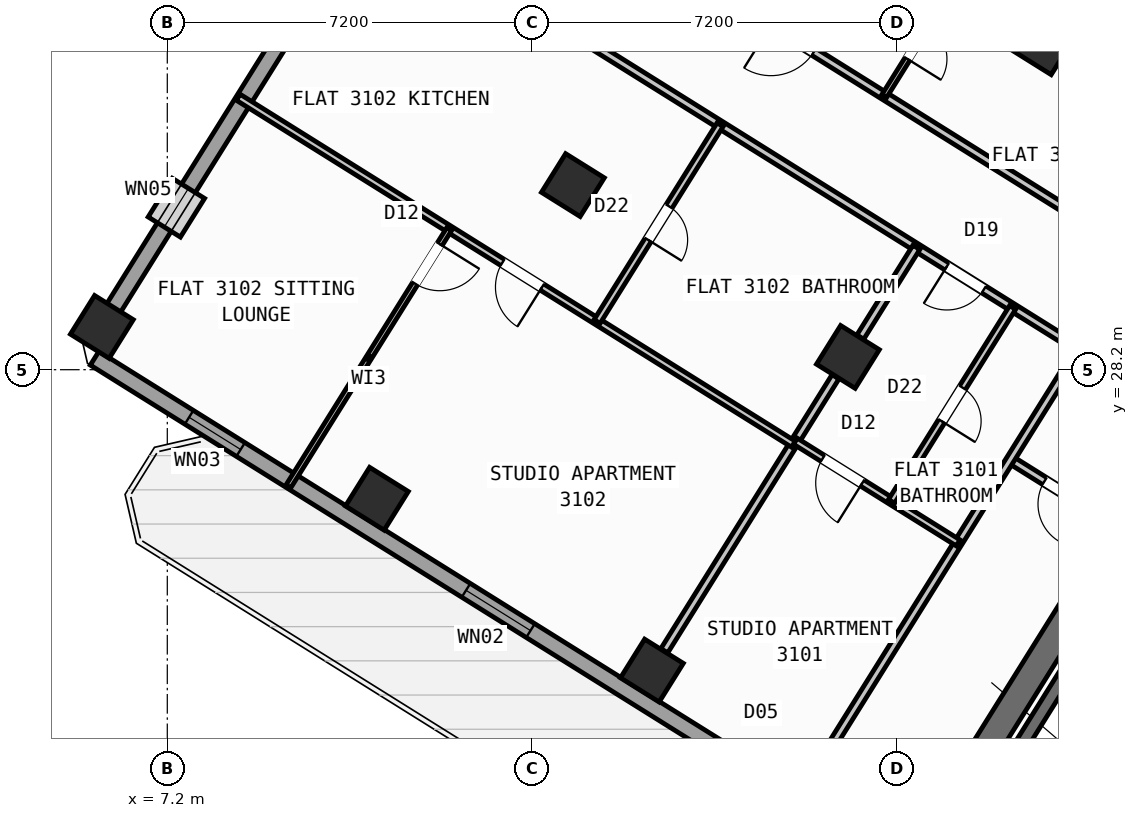
"""IFC4 building model, lengths in metres.
Left out: names, types, materials, properties, quantities, classifications, styles, units other than length and angle.
Written with IfcOpenShell. Run it as: python <this file> out.ifc"""

import sys

from ifc_helpers import new_model, si_unit, direction, frame, frame_2d, origin, origin_2d, place, context, subcontext, project, spatial, rectangle, hollow_rectangle, extrude, source, transform, mapped, element, fill, save


model = new_model("IFC4")
c1 = context("Model", 3, precision=1e-05, world=origin(), true_north=direction((0.0, 1.0)))
c2 = subcontext(c1, "Body", "Model", "MODEL_VIEW")
j1 = project(units=[si_unit("LENGTHUNIT", "METRE"), si_unit("PLANEANGLEUNIT", "RADIAN")], contexts=[c1])
p1 = place(None, origin())
s1 = spatial("IfcSite", under=j1, at=p1, CompositionType="ELEMENT")
p2 = place(p1, origin())
s2 = spatial("IfcBuilding", under=s1, at=p2, CompositionType="ELEMENT")
p3 = place(p2, frame((0.0, 0.0, 123.3)))
s3 = spatial("IfcBuildingStorey", under=s2, at=p3, CompositionType="ELEMENT", Elevation=123.3)
p4 = place(p3, frame((26.007, 24.976, 0.0), z_axis=(0.0, 0.0, 1.0), x_axis=(-0.529923795287, -0.848045264823, 0.0)))
e1 = element("IfcWall", 1, at=p4, inside=s3, PredefinedType="SHEAR", context=c2, shape_type="SweptSolid", body=[
    extrude(rectangle(XDim=6.425, YDim=0.55, at=frame_2d((3.212, 0.0))), origin(), (0.0, 0.0, 1.0), 4.22),
])
m1 = source(origin(), c2, "Body", "SweptSolid", [
    extrude(hollow_rectangle(XDim=0.9, YDim=0.9, WallThickness=0.036, at=origin_2d()), origin(), (0.0, 0.0, 1.0), 4.5),
])
for number, where, z_axis, x_axis in (
    (2, (24.5, 34.643, 0.0), (0.0, 0.0, 1.0), (-0.848, 0.53, 0.0)),
    (3, (20.632, 28.452, 0.0), (0.0, 0.0, 1.0), (-0.848, 0.53, 0.0)),
    (4, (16.764, 22.261, 0.0), (0.0, 0.0, 1.0), (-0.848, 0.53, 0.0)),
    (5, (15.205, 31.844, 0.0), (0.0, 0.0, 1.0), (-0.848, 0.53, 0.0)),
    (6, (11.336, 25.653, 0.0), (0.0, 0.0, 1.0), (-0.848, 0.53, 0.0)),
    (7, (5.909, 29.044, 0.0), (0.0, 0.0, 1.0), (-0.848, 0.53, 0.0)),
):
    element("IfcColumn", number, at=place(p3, frame(where, z_axis=z_axis, x_axis=x_axis)), inside=s3, PredefinedType="COLUMN", context=c2, shape_type="MappedRepresentation", body=[
        mapped(m1, transform((0.0, 0.0, 0.0), scale=1.0)),
    ])
p5 = place(p3, frame((31.76, 12.183, 0.0), z_axis=(0.0, 0.0, 1.0), x_axis=(-0.848047074256, 0.529920899612, 0.0)))
e8 = element("IfcWall", 8, at=p5, inside=s3, PredefinedType="STANDARD", context=c2, shape_type="SweptSolid", body=[
    extrude(rectangle(XDim=30.652, YDim=0.32, at=frame_2d((15.326, 0.0))), origin(), (0.0, 0.0, 1.0), 4.22),
])
p6 = place(p5, frame((14.966, 0.0, 0.0)))
e9 = element("IfcOpeningElement", 9, at=p6, cuts=e8, PredefinedType="OPENING", context=c2, shape_type="SweptSolid", body=[
    extrude(rectangle(XDim=1.2, YDim=2.15, at=frame_2d((0.6, 1.075))), frame((0.0, 0.17, 0.0), z_axis=(0.0, -1.0, 0.0), x_axis=(1.0, 0.0, 0.0)), (0.0, 0.0, 1.0), 0.34),
])
p7 = place(p5, frame((1.871, 0.0, 0.8)))
e10 = element("IfcOpeningElement", 10, at=p7, cuts=e8, PredefinedType="OPENING", context=c2, shape_type="SweptSolid", body=[
    extrude(rectangle(XDim=2.1, YDim=1.55, at=frame_2d((1.05, 0.775))), frame((0.0, 0.17, 0.0), z_axis=(0.0, -1.0, 0.0), x_axis=(1.0, 0.0, 0.0)), (0.0, 0.0, 1.0), 0.34),
])
p8 = place(p5, frame((6.546, 0.0, 0.8)))
e11 = element("IfcOpeningElement", 11, at=p8, cuts=e8, PredefinedType="OPENING", context=c2, shape_type="SweptSolid", body=[
    extrude(rectangle(XDim=2.1, YDim=1.55, at=frame_2d((1.05, 0.775))), frame((0.0, 0.17, 0.0), z_axis=(0.0, -1.0, 0.0), x_axis=(1.0, 0.0, 0.0)), (0.0, 0.0, 1.0), 0.34),
])
p9 = place(p5, frame((20.508, 0.0, 0.85)))
e12 = element("IfcOpeningElement", 12, at=p9, cuts=e8, PredefinedType="OPENING", context=c2, shape_type="SweptSolid", body=[
    extrude(rectangle(XDim=1.5, YDim=1.5, at=frame_2d((0.75, 0.75))), frame((0.0, 0.17, 0.0), z_axis=(0.0, -1.0, 0.0), x_axis=(1.0, 0.0, 0.0)), (0.0, 0.0, 1.0), 0.34),
])
p10 = place(p5, frame((27.253, 0.0, 0.95)))
e13 = element("IfcOpeningElement", 13, at=p10, cuts=e8, PredefinedType="OPENING", context=c2, shape_type="SweptSolid", body=[
    extrude(rectangle(XDim=1.2, YDim=1.4, at=frame_2d((0.6, 0.7))), frame((0.0, 0.17, 0.0), z_axis=(0.0, -1.0, 0.0), x_axis=(1.0, 0.0, 0.0)), (0.0, 0.0, 1.0), 0.34),
])
p11 = place(p3, frame((5.7, 28.71, 0.0), z_axis=(0.0, 0.0, 1.0), x_axis=(0.529923711467, 0.8480453172, 0.0)))
e14 = element("IfcWall", 14, at=p11, inside=s3, PredefinedType="STANDARD", context=c2, shape_type="SweptSolid", body=[
    extrude(rectangle(XDim=21.587, YDim=0.32, at=frame_2d((10.794, 0.0))), origin(), (0.0, 0.0, 1.0), 2.395),
])
p12 = place(p11, frame((2.719, 0.0, 1.0)))
e15 = element("IfcOpeningElement", 15, at=p12, cuts=e14, PredefinedType="OPENING", context=c2, shape_type="SweptSolid", body=[
    extrude(rectangle(XDim=0.9, YDim=1.25, at=frame_2d((0.45, 0.625))), frame((0.0, 0.17, 0.0), z_axis=(0.0, -1.0, 0.0), x_axis=(1.0, 0.0, 0.0)), (0.0, 0.0, 1.0), 0.34),
])
p13 = place(p11, frame((16.525, 0.0, 1.0)))
e16 = element("IfcOpeningElement", 16, at=p13, cuts=e14, PredefinedType="OPENING", context=c2, shape_type="SweptSolid", body=[
    extrude(rectangle(XDim=0.9, YDim=1.25, at=frame_2d((0.45, 0.625))), frame((0.0, 0.17, 0.0), z_axis=(0.0, -1.0, 0.0), x_axis=(1.0, 0.0, 0.0)), (0.0, 0.0, 1.0), 0.34),
])
p14 = place(p11, frame((18.887, 0.0, 1.0)))
e17 = element("IfcOpeningElement", 17, at=p14, cuts=e14, PredefinedType="OPENING", context=c2, shape_type="SweptSolid", body=[
    extrude(rectangle(XDim=0.9, YDim=1.25, at=frame_2d((0.45, 0.625))), frame((0.0, 0.17, 0.0), z_axis=(0.0, -1.0, 0.0), x_axis=(1.0, 0.0, 0.0)), (0.0, 0.0, 1.0), 0.34),
])
p15 = place(p3, frame((17.424, 47.083, 0.0), z_axis=(0.0, 0.0, 1.0), x_axis=(0.848049927979, -0.529916332693, 0.0)))
e18 = element("IfcWall", 18, at=p15, inside=s3, PredefinedType="STANDARD", context=c2, shape_type="SweptSolid", body=[
    extrude(rectangle(XDim=29.223, YDim=0.32, at=frame_2d((14.612, 0.0))), origin(), (0.0, 0.0, 1.0), 4.22),
])
p16 = place(p15, frame((8.839, 0.0, 0.0)))
e19 = element("IfcOpeningElement", 19, at=p16, cuts=e18, PredefinedType="OPENING", context=c2, shape_type="SweptSolid", body=[
    extrude(rectangle(XDim=1.05, YDim=2.15, at=frame_2d((0.525, 1.075))), frame((0.0, 0.17, 0.0), z_axis=(0.0, -1.0, 0.0), x_axis=(1.0, 0.0, 0.0)), (0.0, 0.0, 1.0), 0.34),
])
p17 = place(p15, frame((0.719, 0.0, 0.85)))
e20 = element("IfcOpeningElement", 20, at=p17, cuts=e18, PredefinedType="OPENING", context=c2, shape_type="SweptSolid", body=[
    extrude(rectangle(XDim=1.8, YDim=1.5, at=frame_2d((0.9, 0.75))), frame((0.0, 0.17, 0.0), z_axis=(0.0, -1.0, 0.0), x_axis=(1.0, 0.0, 0.0)), (0.0, 0.0, 1.0), 0.34),
])
p18 = place(p15, frame((3.981, 0.0, 0.85)))
e21 = element("IfcOpeningElement", 21, at=p18, cuts=e18, PredefinedType="OPENING", context=c2, shape_type="SweptSolid", body=[
    extrude(rectangle(XDim=1.5, YDim=1.5, at=frame_2d((0.75, 0.75))), frame((0.0, 0.17, 0.0), z_axis=(0.0, -1.0, 0.0), x_axis=(1.0, 0.0, 0.0)), (0.0, 0.0, 1.0), 0.34),
])
p19 = place(p15, frame((7.021, 0.0, 0.95)))
e22 = element("IfcOpeningElement", 22, at=p19, cuts=e18, PredefinedType="OPENING", context=c2, shape_type="SweptSolid", body=[
    extrude(rectangle(XDim=1.2, YDim=1.4, at=frame_2d((0.6, 0.7))), frame((0.0, 0.17, 0.0), z_axis=(0.0, -1.0, 0.0), x_axis=(1.0, 0.0, 0.0)), (0.0, 0.0, 1.0), 0.34),
])
p20 = place(p15, frame((14.471, 0.0, 0.95)))
e23 = element("IfcOpeningElement", 23, at=p20, cuts=e18, PredefinedType="OPENING", context=c2, shape_type="SweptSolid", body=[
    extrude(rectangle(XDim=1.2, YDim=1.4, at=frame_2d((0.6, 0.7))), frame((0.0, 0.17, 0.0), z_axis=(0.0, -1.0, 0.0), x_axis=(1.0, 0.0, 0.0)), (0.0, 0.0, 1.0), 0.34),
])
p21 = place(p15, frame((17.254, 0.0, 1.0)))
e24 = element("IfcOpeningElement", 24, at=p21, cuts=e18, PredefinedType="OPENING", context=c2, shape_type="SweptSolid", body=[
    extrude(rectangle(XDim=0.9, YDim=1.25, at=frame_2d((0.45, 0.625))), frame((0.0, 0.17, 0.0), z_axis=(0.0, -1.0, 0.0), x_axis=(1.0, 0.0, 0.0)), (0.0, 0.0, 1.0), 0.34),
])
p22 = place(p15, frame((20.764, 0.0, 0.8)))
e25 = element("IfcOpeningElement", 25, at=p22, cuts=e18, PredefinedType="OPENING", context=c2, shape_type="SweptSolid", body=[
    extrude(rectangle(XDim=2.1, YDim=1.55, at=frame_2d((1.05, 0.775))), frame((0.0, 0.17, 0.0), z_axis=(0.0, -1.0, 0.0), x_axis=(1.0, 0.0, 0.0)), (0.0, 0.0, 1.0), 0.34),
])
p23 = place(p15, frame((25.403, 0.0, 0.8)))
e26 = element("IfcOpeningElement", 26, at=p23, cuts=e18, PredefinedType="OPENING", context=c2, shape_type="SweptSolid", body=[
    extrude(rectangle(XDim=2.1, YDim=1.55, at=frame_2d((1.05, 0.775))), frame((0.0, 0.17, 0.0), z_axis=(0.0, -1.0, 0.0), x_axis=(1.0, 0.0, 0.0)), (0.0, 0.0, 1.0), 0.34),
])
p24 = place(p3, frame((24.945, 22.22, 0.0), z_axis=(0.0, 0.0, 1.0), x_axis=(-0.529908658664, -0.84805472316, 0.0)))
e27 = element("IfcWall", 27, at=p24, inside=s3, PredefinedType="SHEAR", context=c2, shape_type="SweptSolid", body=[
    extrude(rectangle(XDim=3.16, YDim=0.26, at=frame_2d((1.58, 0.0))), origin(), (0.0, 0.0, 1.0), 4.22),
])
p25 = place(p3, frame((26.049, 25.044, 0.0), z_axis=(0.0, 0.0, 1.0), x_axis=(-0.848050851465, 0.529914854792, 0.0)))
e28 = element("IfcWall", 28, at=p25, inside=s3, PredefinedType="PARTITIONING", context=c2, shape_type="SweptSolid", body=[
    extrude(rectangle(XDim=2.61, YDim=0.16, at=frame_2d((1.305, 0.0))), origin(), (0.0, 0.0, 1.0), 3.645),
])
p26 = place(p25, frame((0.95, 0.0, 0.0)))
e29 = element("IfcOpeningElement", 29, at=p26, cuts=e28, PredefinedType="OPENING", context=c2, shape_type="SweptSolid", body=[
    extrude(rectangle(XDim=0.86, YDim=2.05, at=frame_2d((0.43, 1.025))), frame((0.0, 0.09, 0.0), z_axis=(0.0, -1.0, 0.0), x_axis=(1.0, 0.0, 0.0)), (0.0, 0.0, 1.0), 0.18),
])
p27 = place(p3, frame((25.198, 28.606, 0.0), z_axis=(0.0, 0.0, 1.0), x_axis=(-0.529926497642, -0.848043576178, 0.0)))
e30 = element("IfcWall", 30, at=p27, inside=s3, PredefinedType="PARTITIONING", context=c2, shape_type="SweptSolid", body=[
    extrude(rectangle(XDim=10.3, YDim=0.16, at=frame_2d((5.15, 0.0))), origin(), (0.0, 0.0, 1.0), 4.21),
])
p28 = place(p3, frame((26.363, 30.472, 0.0), z_axis=(0.0, 0.0, 1.0), x_axis=(-0.848052408131, 0.529912363569, 0.0)))
e31 = element("IfcWall", 31, at=p28, inside=s3, PredefinedType="PARTITIONING", context=c2, shape_type="SweptSolid", body=[
    extrude(rectangle(XDim=16.73, YDim=0.16, at=frame_2d((8.365, 0.0))), origin(), (0.0, 0.0, 1.0), 4.21),
])
p29 = place(p28, frame((7.55, 0.0, 0.0)))
e32 = element("IfcOpeningElement", 32, at=p29, cuts=e31, PredefinedType="OPENING", context=c2, shape_type="SweptSolid", body=[
    extrude(rectangle(XDim=1.0, YDim=2.1, at=frame_2d((0.5, 1.05))), frame((0.0, 0.09, 0.0), z_axis=(0.0, -1.0, 0.0), x_axis=(1.0, 0.0, 0.0)), (0.0, 0.0, 1.0), 0.18),
])
p30 = place(p28, frame((11.14, 0.0, 0.0)))
e33 = element("IfcOpeningElement", 33, at=p30, cuts=e31, PredefinedType="OPENING", context=c2, shape_type="SweptSolid", body=[
    extrude(rectangle(XDim=1.0, YDim=2.1, at=frame_2d((0.5, 1.05))), frame((0.0, 0.09, 0.0), z_axis=(0.0, -1.0, 0.0), x_axis=(1.0, 0.0, 0.0)), (0.0, 0.0, 1.0), 0.18),
])
p31 = place(p3, frame((25.198, 28.606, 0.0), z_axis=(0.0, 0.0, 1.0), x_axis=(-0.848052408131, 0.529912363569, 0.0)))
e34 = element("IfcWall", 34, at=p31, inside=s3, PredefinedType="PARTITIONING", context=c2, shape_type="SweptSolid", body=[
    extrude(rectangle(XDim=16.73, YDim=0.16, at=frame_2d((8.365, 0.0))), origin(), (0.0, 0.0, 1.0), 4.21),
])
p32 = place(p31, frame((2.22, 0.0, 0.0)))
e35 = element("IfcOpeningElement", 35, at=p32, cuts=e34, PredefinedType="OPENING", context=c2, shape_type="SweptSolid", body=[
    extrude(rectangle(XDim=0.86, YDim=2.05, at=frame_2d((0.43, 1.025))), frame((0.0, 0.09, 0.0), z_axis=(0.0, -1.0, 0.0), x_axis=(1.0, 0.0, 0.0)), (0.0, 0.0, 1.0), 0.18),
])
p33 = place(p31, frame((12.084, 0.0, 0.0)))
e36 = element("IfcOpeningElement", 36, at=p33, cuts=e34, PredefinedType="OPENING", context=c2, shape_type="SweptSolid", body=[
    extrude(rectangle(XDim=1.0, YDim=2.1, at=frame_2d((0.5, 1.05))), frame((0.0, 0.09, 0.0), z_axis=(0.0, -1.0, 0.0), x_axis=(1.0, 0.0, 0.0)), (0.0, 0.0, 1.0), 0.18),
])
p34 = place(p3, frame((21.983, 30.615, 0.0), z_axis=(0.0, 0.0, 1.0), x_axis=(-0.529956894714, -0.848024580862, 0.0)))
e37 = element("IfcWall", 37, at=p34, inside=s3, PredefinedType="PARTITIONING", context=c2, shape_type="SweptSolid", body=[
    extrude(rectangle(XDim=2.088, YDim=0.16, at=frame_2d((1.044, 0.0))), origin(), (0.0, 0.0, 1.0), 2.395),
])
p35 = place(p3, frame((20.387, 28.06, 0.0), z_axis=(0.0, 0.0, 1.0), x_axis=(-0.529902564924, -0.848058530814, 0.0)))
e38 = element("IfcWall", 38, at=p35, inside=s3, PredefinedType="PARTITIONING", context=c2, shape_type="SweptSolid", body=[
    extrude(rectangle(XDim=6.376, YDim=0.16, at=frame_2d((3.188, 0.0))), origin(), (0.0, 0.0, 1.0), 2.395),
])
p36 = place(p3, frame((22.807, 24.781, 0.0), z_axis=(0.0, 0.0, 1.0), x_axis=(-0.84803087207, 0.529946827537, 0.0)))
e39 = element("IfcWall", 39, at=p36, inside=s3, PredefinedType="PLUMBINGWALL", context=c2, shape_type="SweptSolid", body=[
    extrude(rectangle(XDim=3.79, YDim=0.14, at=frame_2d((1.895, 0.0))), origin(), (0.0, 0.0, 1.0), 4.21),
])
p37 = place(p36, frame((2.23, 0.0, 0.0)))
e40 = element("IfcOpeningElement", 40, at=p37, cuts=e39, PredefinedType="OPENING", context=c2, shape_type="SweptSolid", body=[
    extrude(rectangle(XDim=0.92, YDim=2.08, at=frame_2d((0.46, 1.04))), frame((0.0, 0.08, 0.0), z_axis=(0.0, -1.0, 0.0), x_axis=(1.0, 0.0, 0.0)), (0.0, 0.0, 1.0), 0.16),
])
p38 = place(p3, frame((23.883, 29.427, 0.0), z_axis=(0.0, 0.0, 1.0), x_axis=(-0.529950281337, -0.84802871373, 0.0)))
e41 = element("IfcWall", 41, at=p38, inside=s3, PredefinedType="PLUMBINGWALL", context=c2, shape_type="SweptSolid", body=[
    extrude(rectangle(XDim=4.51, YDim=0.14, at=frame_2d((2.255, 0.0))), origin(), (0.0, 0.0, 1.0), 3.865),
])
p39 = place(p38, frame((1.865, 0.0, 0.0)))
e42 = element("IfcOpeningElement", 42, at=p39, cuts=e41, PredefinedType="OPENING", context=c2, shape_type="SweptSolid", body=[
    extrude(rectangle(XDim=0.78, YDim=2.05, at=frame_2d((0.39, 1.025))), frame((0.0, 0.08, 0.0), z_axis=(0.0, -1.0, 0.0), x_axis=(1.0, 0.0, 0.0)), (0.0, 0.0, 1.0), 0.16),
])
p40 = place(p3, frame((19.556, 26.73, 0.0), z_axis=(0.0, 0.0, 1.0), x_axis=(-0.848043949058, 0.52992590092, 0.0)))
e43 = element("IfcWall", 43, at=p40, inside=s3, PredefinedType="PLUMBINGWALL", context=c2, shape_type="SweptSolid", body=[
    extrude(rectangle(XDim=12.92, YDim=0.14, at=frame_2d((6.46, 0.0))), origin(), (0.0, 0.0, 1.0), 4.21),
])
p41 = place(p40, frame((5.849, 0.0, 0.0)))
e44 = element("IfcOpeningElement", 44, at=p41, cuts=e43, PredefinedType="OPENING", context=c2, shape_type="SweptSolid", body=[
    extrude(rectangle(XDim=0.92, YDim=2.08, at=frame_2d((0.46, 1.04))), frame((0.0, 0.08, 0.0), z_axis=(0.0, -1.0, 0.0), x_axis=(1.0, 0.0, 0.0)), (0.0, 0.0, 1.0), 0.16),
])
p42 = place(p3, frame((18.109, 33.035, 0.0), z_axis=(0.0, 0.0, 1.0), x_axis=(-0.529893526057, -0.848064178611, 0.0)))
e45 = element("IfcWall", 45, at=p42, inside=s3, PredefinedType="PLUMBINGWALL", context=c2, shape_type="SweptSolid", body=[
    extrude(rectangle(XDim=4.58, YDim=0.14, at=frame_2d((2.29, 0.0))), origin(), (0.0, 0.0, 1.0), 4.21),
])
p43 = place(p42, frame((1.9, 0.0, 0.0)))
e46 = element("IfcOpeningElement", 46, at=p43, cuts=e45, PredefinedType="OPENING", context=c2, shape_type="SweptSolid", body=[
    extrude(rectangle(XDim=0.78, YDim=2.05, at=frame_2d((0.39, 1.025))), frame((0.0, 0.08, 0.0), z_axis=(0.0, -1.0, 0.0), x_axis=(1.0, 0.0, 0.0)), (0.0, 0.0, 1.0), 0.16),
])
p44 = place(p3, frame((12.763, 30.975, 0.0), z_axis=(0.0, 0.0, 1.0), x_axis=(-0.529947646893, -0.848030360042, 0.0)))
e47 = element("IfcWall", 47, at=p44, inside=s3, PredefinedType="PARTITIONING", context=c2, shape_type="SweptSolid", body=[
    extrude(rectangle(XDim=5.99, YDim=0.11, at=frame_2d((2.995, 0.0))), origin(), (0.0, 0.0, 1.0), 4.21),
])
p45 = place(p44, frame((0.35, 0.0, 0.0)))
e48 = element("IfcOpeningElement", 48, at=p45, cuts=e47, PredefinedType="OPENING", context=c2, shape_type="SweptSolid", body=[
    extrude(rectangle(XDim=0.92, YDim=2.08, at=frame_2d((0.46, 1.04))), frame((0.0, 0.065, 0.0), z_axis=(0.0, -1.0, 0.0), x_axis=(1.0, 0.0, 0.0)), (0.0, 0.0, 1.0), 0.13),
])
p46 = place(p3, frame((26.37, 41.635, 0.0), z_axis=(0.0, 0.0, 1.0), x_axis=(-0.529917830441, -0.848048992088, 0.0)))
e49 = element("IfcWall", 49, at=p46, inside=s3, PredefinedType="PARTITIONING", context=c2, shape_type="SweptSolid", body=[
    extrude(rectangle(XDim=9.47, YDim=0.11, at=frame_2d((4.735, 0.0))), origin(), (0.0, 0.0, 1.0), 3.865),
])
p47 = place(p46, frame((7.83, 0.0, 0.0)))
e50 = element("IfcOpeningElement", 50, at=p47, cuts=e49, PredefinedType="OPENING", context=c2, shape_type="SweptSolid", body=[
    extrude(rectangle(XDim=0.78, YDim=2.05, at=frame_2d((0.39, 1.025))), frame((0.0, 0.065, 0.0), z_axis=(0.0, -1.0, 0.0), x_axis=(1.0, 0.0, 0.0)), (0.0, 0.0, 1.0), 0.13),
])
p48 = place(p46, frame((3.075, 0.0, 0.0)))
e51 = element("IfcOpeningElement", 51, at=p48, cuts=e49, PredefinedType="OPENING", context=c2, shape_type="SweptSolid", body=[
    extrude(rectangle(XDim=0.92, YDim=2.08, at=frame_2d((0.46, 1.04))), frame((0.0, 0.065, 0.0), z_axis=(0.0, -1.0, 0.0), x_axis=(1.0, 0.0, 0.0)), (0.0, 0.0, 1.0), 0.13),
])
p49 = place(p3, frame((27.635, 32.507, 0.0), z_axis=(0.0, 0.0, 1.0), x_axis=(-0.848064240775, 0.529893426567, 0.0)))
e52 = element("IfcWall", 52, at=p49, inside=s3, PredefinedType="PLUMBINGWALL", context=c2, shape_type="SweptSolid", body=[
    extrude(rectangle(XDim=3.328, YDim=0.14, at=frame_2d((1.664, 0.0))), origin(), (0.0, 0.0, 1.0), 2.395),
])
m2 = source(origin(), c2, "Body", "SweptSolid", [
    extrude(rectangle(XDim=1.5, YDim=1.5, at=frame_2d((0.75, 0.75))), frame((0.0, 0.03, 0.0), z_axis=(0.0, -1.0, 0.0), x_axis=(1.0, 0.0, 0.0)), (0.0, 0.0, 1.0), 0.06),
])
p50 = place(p9, origin())
e53 = element("IfcWindow", 53, at=p50, inside=s3, PartitioningType="SINGLE_PANEL", PredefinedType="WINDOW", context=c2, shape_type="MappedRepresentation", body=[
    mapped(m2, transform((0.0, 0.0, 0.0), scale=1.0)),
])
fill(e12, e53)
m3 = source(origin(), c2, "Body", "SweptSolid", [
    extrude(rectangle(XDim=1.2, YDim=1.4, at=frame_2d((0.6, 0.7))), frame((0.0, 0.03, 0.0), z_axis=(0.0, -1.0, 0.0), x_axis=(1.0, 0.0, 0.0)), (0.0, 0.0, 1.0), 0.06),
])
p51 = place(p10, origin())
e54 = element("IfcWindow", 54, at=p51, inside=s3, PartitioningType="SINGLE_PANEL", PredefinedType="WINDOW", context=c2, shape_type="MappedRepresentation", body=[
    mapped(m3, transform((0.0, 0.0, 0.0), scale=1.0)),
])
fill(e13, e54)
m4 = source(origin(), c2, "Body", "SweptSolid", [
    extrude(rectangle(XDim=0.9, YDim=1.25, at=frame_2d((0.45, 0.625))), frame((0.0, 0.03, 0.0), z_axis=(0.0, -1.0, 0.0), x_axis=(1.0, 0.0, 0.0)), (0.0, 0.0, 1.0), 0.06),
])
p52 = place(p12, origin())
e55 = element("IfcWindow", 55, at=p52, inside=s3, PartitioningType="SINGLE_PANEL", PredefinedType="WINDOW", context=c2, shape_type="MappedRepresentation", body=[
    mapped(m4, transform((0.0, 0.0, 0.0), scale=1.0)),
])
fill(e15, e55)
m5 = source(origin(), c2, "Body", "SweptSolid", [
    extrude(rectangle(XDim=0.86, YDim=2.05, at=frame_2d((0.43, 1.025))), frame((0.0, 0.025, 0.0), z_axis=(0.0, -1.0, 0.0), x_axis=(1.0, 0.0, 0.0)), (0.0, 0.0, 1.0), 0.05),
])
p53 = place(p26, origin())
e56 = element("IfcDoor", 56, at=p53, inside=s3, OperationType="SINGLE_SWING_LEFT", PredefinedType="DOOR", context=c2, shape_type="MappedRepresentation", body=[
    mapped(m5, transform((0.0, 0.0, 0.0), scale=1.0)),
])
fill(e29, e56)
p54 = place(p32, origin())
e57 = element("IfcDoor", 57, at=p54, inside=s3, OperationType="SINGLE_SWING_RIGHT", PredefinedType="DOOR", context=c2, shape_type="MappedRepresentation", body=[
    mapped(m5, transform((0.0, 0.0, 0.0), scale=1.0)),
])
fill(e35, e57)
m6 = source(origin(), c2, "Body", "SweptSolid", [
    extrude(rectangle(XDim=0.92, YDim=2.08, at=frame_2d((0.46, 1.04))), frame((0.0, 0.025, 0.0), z_axis=(0.0, -1.0, 0.0), x_axis=(1.0, 0.0, 0.0)), (0.0, 0.0, 1.0), 0.05),
])
p55 = place(p37, origin())
e58 = element("IfcDoor", 58, at=p55, inside=s3, OperationType="SINGLE_SWING_LEFT", PredefinedType="DOOR", context=c2, shape_type="MappedRepresentation", body=[
    mapped(m6, transform((0.0, 0.0, 0.0), scale=1.0)),
])
fill(e40, e58)
m7 = source(origin(), c2, "Body", "SweptSolid", [
    extrude(rectangle(XDim=0.78, YDim=2.05, at=frame_2d((0.39, 1.025))), frame((0.0, 0.025, 0.0), z_axis=(0.0, -1.0, 0.0), x_axis=(1.0, 0.0, 0.0)), (0.0, 0.0, 1.0), 0.05),
])
p56 = place(p39, origin())
e59 = element("IfcDoor", 59, at=p56, inside=s3, OperationType="SINGLE_SWING_RIGHT", PredefinedType="DOOR", context=c2, shape_type="MappedRepresentation", body=[
    mapped(m7, transform((0.0, 0.0, 0.0), scale=1.0)),
])
fill(e42, e59)
p57 = place(p45, origin())
e60 = element("IfcDoor", 60, at=p57, inside=s3, OperationType="SINGLE_SWING_LEFT", PredefinedType="DOOR", context=c2, shape_type="MappedRepresentation", body=[
    mapped(m6, transform((0.0, 0.0, 0.0), scale=1.0)),
])
fill(e48, e60)
p58 = place(p41, origin())
e61 = element("IfcDoor", 61, at=p58, inside=s3, OperationType="SINGLE_SWING_LEFT", PredefinedType="DOOR", context=c2, shape_type="MappedRepresentation", body=[
    mapped(m6, transform((0.0, 0.0, 0.0), scale=1.0)),
])
fill(e44, e61)
p59 = place(p43, origin())
e62 = element("IfcDoor", 62, at=p59, inside=s3, OperationType="SINGLE_SWING_RIGHT", PredefinedType="DOOR", context=c2, shape_type="MappedRepresentation", body=[
    mapped(m7, transform((0.0, 0.0, 0.0), scale=1.0)),
])
fill(e46, e62)
m8 = source(origin(), c2, "Body", "SweptSolid", [
    extrude(rectangle(XDim=1.0, YDim=2.1, at=frame_2d((0.5, 1.05))), frame((0.0, 0.025, 0.0), z_axis=(0.0, -1.0, 0.0), x_axis=(1.0, 0.0, 0.0)), (0.0, 0.0, 1.0), 0.05),
])
p60 = place(p29, origin())
e63 = element("IfcDoor", 63, at=p60, inside=s3, OperationType="SINGLE_SWING_RIGHT", PredefinedType="DOOR", context=c2, shape_type="MappedRepresentation", body=[
    mapped(m8, transform((0.0, 0.0, 0.0), scale=1.0)),
])
fill(e32, e63)
p61 = place(p47, origin())
e64 = element("IfcDoor", 64, at=p61, inside=s3, OperationType="SINGLE_SWING_RIGHT", PredefinedType="DOOR", context=c2, shape_type="MappedRepresentation", body=[
    mapped(m7, transform((0.0, 0.0, 0.0), scale=1.0)),
])
fill(e50, e64)
save(model, sys.argv[1])
